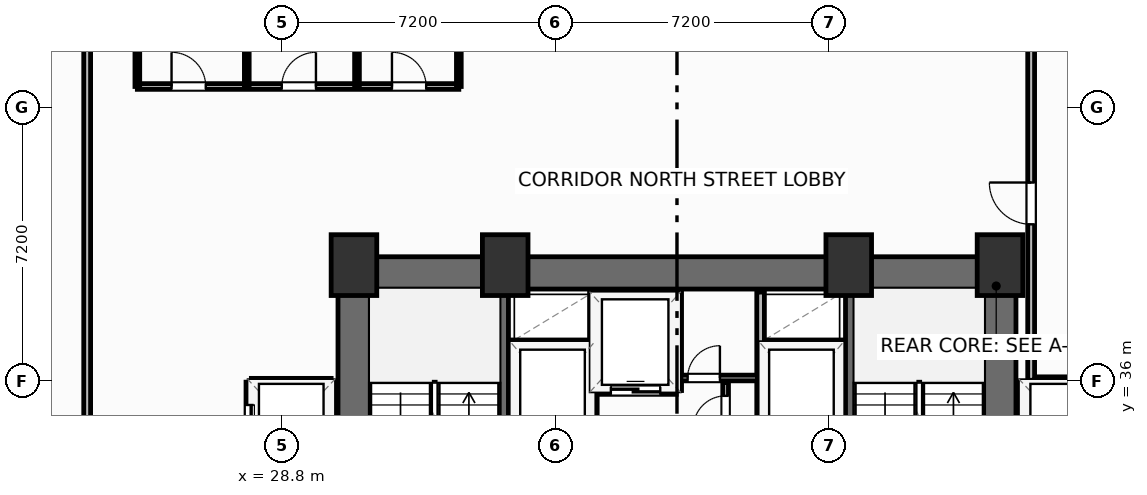
"""IFC4 building model, lengths in metres.
Left out: names, types, materials, properties, quantities, classifications, styles, units other than length and angle.
Written with IfcOpenShell. Run it as: python <this file> out.ifc"""

import sys

from ifc_helpers import new_model, si_unit, direction, frame, frame_2d, origin, origin_2d, place, context, subcontext, project, spatial, rectangle, extrude, element, fill, save


model = new_model("IFC4")
c1 = context("Model", 3, precision=1e-05, world=origin(), true_north=direction((0.0, 1.0)))
c2 = subcontext(c1, "Body", "Model", "MODEL_VIEW")
j1 = project(units=[si_unit("LENGTHUNIT", "METRE"), si_unit("PLANEANGLEUNIT", "RADIAN")], contexts=[c1])
p1 = place(None, origin())
s1 = spatial("IfcSite", under=j1, at=p1, CompositionType="ELEMENT")
p2 = place(p1, origin())
s2 = spatial("IfcBuilding", under=s1, at=p2, CompositionType="ELEMENT")
p3 = place(p2, origin())
s3 = spatial("IfcBuildingStorey", under=s2, at=p3, CompositionType="ELEMENT", Elevation=0.0)
for number, where, z_axis, x_axis in (
    (1, (30.7, 39.05, 0.0), (0.0, 0.0, 1.0), (1.0, 0.0, 0.0)),
    (2, (34.68, 39.05, 0.0), (0.0, 0.0, 1.0), (1.0, 0.0, 0.0)),
    (3, (43.72, 39.05, 0.0), (0.0, 0.0, 1.0), (1.0, 0.0, 0.0)),
    (4, (47.7, 39.05, 0.0), (0.0, 0.0, 1.0), (1.0, 0.0, 0.0)),
):
    element("IfcColumn", number, at=place(p3, frame(where, z_axis=z_axis, x_axis=x_axis)), inside=s3, PredefinedType="COLUMN", context=c2, shape_type="SweptSolid", body=[
        extrude(rectangle(XDim=1.2, YDim=1.6, at=origin_2d()), origin(), (0.0, 0.0, 1.0), 5.4),
    ])
p4 = place(p3, frame((30.28, 38.845, 0.0), z_axis=(0.0, 0.0, 1.0), x_axis=(1.0, 0.0, 0.0)))
e5 = element("IfcWall", 5, at=p4, inside=s3, PredefinedType="SHEAR", context=c2, shape_type="SweptSolid", body=[
    extrude(rectangle(XDim=17.84, YDim=0.85, at=frame_2d((8.92, 0.0))), origin(), (0.0, 0.0, 1.0), 5.12),
])
for number, where, z_axis, x_axis in (
    (6, (30.705, 29.2, 0.0), (0.0, 0.0, 1.0), (0.0, 1.0, 0.0)),
    (7, (47.695, 29.2, 0.0), (0.0, 0.0, 1.0), (0.0, 1.0, 0.0)),
):
    element("IfcWall", number, at=place(p3, frame(where, z_axis=z_axis, x_axis=x_axis)), inside=s3, PredefinedType="SHEAR", context=c2, shape_type="SweptSolid", body=[
        extrude(rectangle(XDim=9.22, YDim=0.85, at=frame_2d((4.61, 0.0))), origin(), (0.0, 0.0, 1.0), 5.12),
    ])
for number, where, z_axis, x_axis in (
    (8, (34.64, 29.2, 0.0), (0.0, 0.0, 1.0), (0.0, 1.0, 0.0)),
    (9, (43.76, 29.2, 0.0), (0.0, 0.0, 1.0), (0.0, 1.0, 0.0)),
):
    element("IfcWall", number, at=place(p3, frame(where, z_axis=z_axis, x_axis=x_axis)), inside=s3, PredefinedType="SHEAR", context=c2, shape_type="SweptSolid", body=[
        extrude(rectangle(XDim=9.22, YDim=0.25, at=frame_2d((4.61, 0.0))), origin(), (0.0, 0.0, 1.0), 5.12),
    ])
p5 = place(p3, frame((25.0, 43.75, 0.0), z_axis=(0.0, 0.0, 1.0), x_axis=(1.0, 0.0, 0.0)))
e10 = element("IfcWall", 10, at=p5, inside=s3, PredefinedType="PARTITIONING", context=c2, shape_type="SweptSolid", body=[
    extrude(rectangle(XDim=8.46, YDim=0.15, at=frame_2d((4.23, 0.0))), origin(), (0.0, 0.0, 1.0), 5.12),
])
p6 = place(p5, frame((0.9, 0.0, 0.0)))
e11 = element("IfcOpeningElement", 11, at=p6, cuts=e10, PredefinedType="OPENING", context=c2, shape_type="SweptSolid", body=[
    extrude(rectangle(XDim=0.9, YDim=2.05, at=frame_2d((0.45, 1.025))), frame((0.0, 0.085, 0.0), z_axis=(0.0, -1.0, 0.0), x_axis=(1.0, 0.0, 0.0)), (0.0, 0.0, 1.0), 0.17),
])
p7 = place(p5, frame((3.8, 0.0, 0.0)))
e12 = element("IfcOpeningElement", 12, at=p7, cuts=e10, PredefinedType="OPENING", context=c2, shape_type="SweptSolid", body=[
    extrude(rectangle(XDim=0.9, YDim=2.05, at=frame_2d((0.45, 1.025))), frame((0.0, 0.085, 0.0), z_axis=(0.0, -1.0, 0.0), x_axis=(1.0, 0.0, 0.0)), (0.0, 0.0, 1.0), 0.17),
])
p8 = place(p5, frame((6.7, 0.0, 0.0)))
e13 = element("IfcOpeningElement", 13, at=p8, cuts=e10, PredefinedType="OPENING", context=c2, shape_type="SweptSolid", body=[
    extrude(rectangle(XDim=0.9, YDim=2.05, at=frame_2d((0.45, 1.025))), frame((0.0, 0.085, 0.0), z_axis=(0.0, -1.0, 0.0), x_axis=(1.0, 0.0, 0.0)), (0.0, 0.0, 1.0), 0.17),
])
for number, where, z_axis, x_axis in (
    (14, (25.0, 43.75, 0.0), (0.0, 0.0, 1.0), (0.0, 1.0, 0.0)),
    (15, (27.88, 43.75, 0.0), (0.0, 0.0, 1.0), (0.0, 1.0, 0.0)),
    (16, (30.78, 43.75, 0.0), (0.0, 0.0, 1.0), (0.0, 1.0, 0.0)),
    (17, (33.46, 43.75, 0.0), (0.0, 0.0, 1.0), (0.0, 1.0, 0.0)),
):
    element("IfcWall", number, at=place(p3, frame(where, z_axis=z_axis, x_axis=x_axis)), inside=s3, PredefinedType="PARTITIONING", context=c2, shape_type="SweptSolid", body=[
        extrude(rectangle(XDim=5.13, YDim=0.125, at=frame_2d((2.565, 0.0))), origin(), (0.0, 0.0, 1.0), 5.12),
    ])
p9 = place(p3, frame((23.68, 28.8, 0.0), z_axis=(0.0, 0.0, 1.0), x_axis=(0.0, 1.0, 0.0)))
e18 = element("IfcWall", 18, at=p9, inside=s3, PredefinedType="PARTITIONING", context=c2, shape_type="SweptSolid", body=[
    extrude(rectangle(XDim=21.52, YDim=0.18, at=frame_2d((10.76, 0.0))), origin(), (0.0, 0.0, 1.0), 5.12),
])
p10 = place(p3, frame((48.52, 36.02, 0.0), z_axis=(0.0, 0.0, 1.0), x_axis=(1.0, 0.0, 0.0)))
e19 = element("IfcWall", 19, at=p10, inside=s3, PredefinedType="PARTITIONING", context=c2, shape_type="SweptSolid", body=[
    extrude(rectangle(XDim=3.62, YDim=0.18, at=frame_2d((1.81, 0.0))), origin(), (0.0, 0.0, 1.0), 5.12),
])
p11 = place(p10, frame((2.208, 0.0, 0.0)))
e20 = element("IfcOpeningElement", 20, at=p11, cuts=e19, PredefinedType="OPENING", context=c2, shape_type="SweptSolid", body=[
    extrude(rectangle(XDim=1.1, YDim=2.15, at=frame_2d((0.55, 1.075))), frame((0.0, 0.1, 0.0), z_axis=(0.0, -1.0, 0.0), x_axis=(1.0, 0.0, 0.0)), (0.0, 0.0, 1.0), 0.2),
])
p12 = place(p3, frame((48.52, 36.02, 0.0), z_axis=(0.0, 0.0, 1.0), x_axis=(0.0, 1.0, 0.0)))
e21 = element("IfcWall", 21, at=p12, inside=s3, PredefinedType="PARTITIONING", context=c2, shape_type="SweptSolid", body=[
    extrude(rectangle(XDim=14.3, YDim=0.18, at=frame_2d((7.15, 0.0))), origin(), (0.0, 0.0, 1.0), 5.12),
])
p13 = place(p12, frame((4.103, 0.0, 0.0)))
e22 = element("IfcOpeningElement", 22, at=p13, cuts=e21, PredefinedType="OPENING", context=c2, shape_type="SweptSolid", body=[
    extrude(rectangle(XDim=1.1, YDim=2.15, at=frame_2d((0.55, 1.075))), frame((0.0, 0.1, 0.0), z_axis=(0.0, -1.0, 0.0), x_axis=(1.0, 0.0, 0.0)), (0.0, 0.0, 1.0), 0.2),
])
p14 = place(p3, frame((34.8, 36.98, 0.0), z_axis=(0.0, 0.0, 1.0), x_axis=(1.0, 0.0, 0.0)))
e23 = element("IfcWall", 23, at=p14, inside=s3, PredefinedType="PARTITIONING", context=c2, shape_type="SweptSolid", body=[
    extrude(rectangle(XDim=2.18, YDim=0.2, at=frame_2d((1.09, 0.0))), origin(), (0.0, 0.0, 1.0), 5.12),
])
p15 = place(p3, frame((37.0, 34.44, 0.0), z_axis=(0.0, 0.0, 1.0), x_axis=(0.0, 1.0, 0.0)))
e24 = element("IfcWall", 24, at=p15, inside=s3, PredefinedType="PARTITIONING", context=c2, shape_type="SweptSolid", body=[
    extrude(rectangle(XDim=3.9, YDim=0.2, at=frame_2d((1.95, 0.0))), origin(), (0.0, 0.0, 1.0), 5.12),
])
p16 = place(p3, frame((41.42, 36.98, 0.0), z_axis=(0.0, 0.0, 1.0), x_axis=(1.0, 0.0, 0.0)))
e25 = element("IfcWall", 25, at=p16, inside=s3, PredefinedType="PARTITIONING", context=c2, shape_type="SweptSolid", body=[
    extrude(rectangle(XDim=2.18, YDim=0.2, at=frame_2d((1.09, 0.0))), origin(), (0.0, 0.0, 1.0), 5.12),
])
p17 = place(p3, frame((41.4, 34.44, 0.0), z_axis=(0.0, 0.0, 1.0), x_axis=(0.0, 1.0, 0.0)))
e26 = element("IfcWall", 26, at=p17, inside=s3, PredefinedType="PARTITIONING", context=c2, shape_type="SweptSolid", body=[
    extrude(rectangle(XDim=3.9, YDim=0.2, at=frame_2d((1.95, 0.0))), origin(), (0.0, 0.0, 1.0), 5.12),
])
p18 = place(p3, frame((37.06, 35.75, 0.0), z_axis=(0.0, 0.0, 1.0), x_axis=(1.0, 0.0, 0.0)))
e27 = element("IfcWall", 27, at=p18, inside=s3, PredefinedType="PARTITIONING", context=c2, shape_type="SweptSolid", body=[
    extrude(rectangle(XDim=2.12, YDim=0.2, at=frame_2d((1.06, 0.0))), origin(), (0.0, 0.0, 1.0), 5.12),
])
p19 = place(p18, frame((0.4, 0.0, 0.0)))
e28 = element("IfcOpeningElement", 28, at=p19, cuts=e27, PredefinedType="OPENING", context=c2, shape_type="SweptSolid", body=[
    extrude(rectangle(XDim=1.3, YDim=2.2, at=frame_2d((0.65, 1.1))), frame((0.0, 0.11, 0.0), z_axis=(0.0, -1.0, 0.0), x_axis=(1.0, 0.0, 0.0)), (0.0, 0.0, 1.0), 0.22),
])
p20 = place(p3, frame((39.22, 35.75, 0.0), z_axis=(0.0, 0.0, 1.0), x_axis=(0.0, 1.0, 0.0)))
e29 = element("IfcWall", 29, at=p20, inside=s3, PredefinedType="PARTITIONING", context=c2, shape_type="SweptSolid", body=[
    extrude(rectangle(XDim=2.59, YDim=0.2, at=frame_2d((1.295, 0.0))), origin(), (0.0, 0.0, 1.0), 5.12),
])
p21 = place(p3, frame((39.3, 36.08, 0.0), z_axis=(0.0, 0.0, 1.0), x_axis=(1.0, 0.0, 0.0)))
e30 = element("IfcWall", 30, at=p21, inside=s3, PredefinedType="PARTITIONING", context=c2, shape_type="SweptSolid", body=[
    extrude(rectangle(XDim=2.02, YDim=0.15, at=frame_2d((1.01, 0.0))), origin(), (0.0, 0.0, 1.0), 5.12),
])
p22 = place(p21, frame((0.18, 0.0, 0.0)))
e31 = element("IfcOpeningElement", 31, at=p22, cuts=e30, PredefinedType="OPENING", context=c2, shape_type="SweptSolid", body=[
    extrude(rectangle(XDim=0.85, YDim=2.05, at=frame_2d((0.425, 1.025))), frame((0.0, 0.085, 0.0), z_axis=(0.0, -1.0, 0.0), x_axis=(1.0, 0.0, 0.0)), (0.0, 0.0, 1.0), 0.17),
])
p23 = place(p3, frame((40.48, 34.44, 0.0), z_axis=(0.0, 0.0, 1.0), x_axis=(0.0, 1.0, 0.0)))
e32 = element("IfcWall", 32, at=p23, inside=s3, PredefinedType="PARTITIONING", context=c2, shape_type="SweptSolid", body=[
    extrude(rectangle(XDim=1.52, YDim=0.15, at=frame_2d((0.76, 0.0))), origin(), (0.0, 0.0, 1.0), 5.12),
])
p24 = place(p23, frame((0.32, 0.0, 0.0)))
e33 = element("IfcOpeningElement", 33, at=p24, cuts=e32, PredefinedType="OPENING", context=c2, shape_type="SweptSolid", body=[
    extrude(rectangle(XDim=0.85, YDim=2.05, at=frame_2d((0.425, 1.025))), frame((0.0, 0.085, 0.0), z_axis=(0.0, -1.0, 0.0), x_axis=(1.0, 0.0, 0.0)), (0.0, 0.0, 1.0), 0.17),
])
p25 = place(p3, frame((28.0, 35.97, 0.0), z_axis=(0.0, 0.0, 1.0), x_axis=(1.0, 0.0, 0.0)))
e34 = element("IfcWall", 34, at=p25, inside=s3, PredefinedType="PARTITIONING", context=c2, shape_type="SweptSolid", body=[
    extrude(rectangle(XDim=2.1, YDim=0.2, at=frame_2d((1.05, 0.0))), origin(), (0.0, 0.0, 1.0), 5.12),
])
p26 = place(p3, frame((30.12, 29.08, 0.0), z_axis=(0.0, 0.0, 1.0), x_axis=(0.0, 1.0, 0.0)))
e35 = element("IfcWall", 35, at=p26, inside=s3, PredefinedType="PARTITIONING", context=c2, shape_type="SweptSolid", body=[
    extrude(rectangle(XDim=6.89, YDim=0.2, at=frame_2d((3.445, 0.0))), origin(), (0.0, 0.0, 1.0), 5.12),
])
p27 = place(p3, frame((27.96, 29.08, 0.0), z_axis=(0.0, 0.0, 1.0), x_axis=(0.0, 1.0, 0.0)))
e36 = element("IfcWall", 36, at=p27, inside=s3, PredefinedType="PARTITIONING", context=c2, shape_type="SweptSolid", body=[
    extrude(rectangle(XDim=6.89, YDim=0.2, at=frame_2d((3.445, 0.0))), origin(), (0.0, 0.0, 1.0), 5.12),
])
p28 = place(p27, frame((0.59, 0.0, 0.0)))
e37 = element("IfcOpeningElement", 37, at=p28, cuts=e36, PredefinedType="OPENING", context=c2, shape_type="SweptSolid", body=[
    extrude(rectangle(XDim=1.1, YDim=2.15, at=frame_2d((0.55, 1.075))), frame((0.0, 0.11, 0.0), z_axis=(0.0, -1.0, 0.0), x_axis=(1.0, 0.0, 0.0)), (0.0, 0.0, 1.0), 0.22),
])
p29 = place(p27, frame((2.89, 0.0, 0.0)))
e38 = element("IfcOpeningElement", 38, at=p29, cuts=e36, PredefinedType="OPENING", context=c2, shape_type="SweptSolid", body=[
    extrude(rectangle(XDim=1.1, YDim=2.15, at=frame_2d((0.55, 1.075))), frame((0.0, 0.11, 0.0), z_axis=(0.0, -1.0, 0.0), x_axis=(1.0, 0.0, 0.0)), (0.0, 0.0, 1.0), 0.22),
])
p30 = place(p27, frame((5.19, 0.0, 0.0)))
e39 = element("IfcOpeningElement", 39, at=p30, cuts=e36, PredefinedType="OPENING", context=c2, shape_type="SweptSolid", body=[
    extrude(rectangle(XDim=1.1, YDim=2.15, at=frame_2d((0.55, 1.075))), frame((0.0, 0.11, 0.0), z_axis=(0.0, -1.0, 0.0), x_axis=(1.0, 0.0, 0.0)), (0.0, 0.0, 1.0), 0.22),
])
p31 = place(p3, frame((48.28, 29.08, 0.0), z_axis=(0.0, 0.0, 1.0), x_axis=(0.0, 1.0, 0.0)))
e40 = element("IfcWall", 40, at=p31, inside=s3, PredefinedType="PARTITIONING", context=c2, shape_type="SweptSolid", body=[
    extrude(rectangle(XDim=6.89, YDim=0.2, at=frame_2d((3.445, 0.0))), origin(), (0.0, 0.0, 1.0), 5.12),
])
p32 = place(p6, origin())
e41 = element("IfcDoor", 41, at=p32, inside=s3, OperationType="SINGLE_SWING_LEFT", PredefinedType="DOOR", context=c2, shape_type="SweptSolid", body=[
    extrude(rectangle(XDim=0.9, YDim=2.05, at=frame_2d((0.45, 1.025))), frame((0.0, 0.025, 0.0), z_axis=(0.0, -1.0, 0.0), x_axis=(1.0, 0.0, 0.0)), (0.0, 0.0, 1.0), 0.05),
])
fill(e11, e41)
p33 = place(p7, origin())
e42 = element("IfcDoor", 42, at=p33, inside=s3, OperationType="SINGLE_SWING_RIGHT", PredefinedType="DOOR", context=c2, shape_type="SweptSolid", body=[
    extrude(rectangle(XDim=0.9, YDim=2.05, at=frame_2d((0.45, 1.025))), frame((0.0, 0.025, 0.0), z_axis=(0.0, -1.0, 0.0), x_axis=(1.0, 0.0, 0.0)), (0.0, 0.0, 1.0), 0.05),
])
fill(e12, e42)
p34 = place(p8, origin())
e43 = element("IfcDoor", 43, at=p34, inside=s3, OperationType="SINGLE_SWING_LEFT", PredefinedType="DOOR", context=c2, shape_type="SweptSolid", body=[
    extrude(rectangle(XDim=0.9, YDim=2.05, at=frame_2d((0.45, 1.025))), frame((0.0, 0.025, 0.0), z_axis=(0.0, -1.0, 0.0), x_axis=(1.0, 0.0, 0.0)), (0.0, 0.0, 1.0), 0.05),
])
fill(e13, e43)
p35 = place(p13, origin())
e44 = element("IfcDoor", 44, at=p35, inside=s3, OperationType="SINGLE_SWING_RIGHT", PredefinedType="DOOR", context=c2, shape_type="SweptSolid", body=[
    extrude(rectangle(XDim=1.1, YDim=2.15, at=frame_2d((0.55, 1.075))), frame((0.0, 0.025, 0.0), z_axis=(0.0, -1.0, 0.0), x_axis=(1.0, 0.0, 0.0)), (0.0, 0.0, 1.0), 0.05),
])
fill(e22, e44)
p36 = place(p19, origin())
e45 = element("IfcDoor", 45, at=p36, inside=s3, OperationType="SLIDING_TO_LEFT", PredefinedType="DOOR", context=c2, shape_type="SweptSolid", body=[
    extrude(rectangle(XDim=1.3, YDim=2.2, at=frame_2d((0.65, 1.1))), frame((0.0, 0.025, 0.0), z_axis=(0.0, -1.0, 0.0), x_axis=(1.0, 0.0, 0.0)), (0.0, 0.0, 1.0), 0.05),
])
fill(e28, e45)
p37 = place(p22, origin())
e46 = element("IfcDoor", 46, at=p37, inside=s3, OperationType="SINGLE_SWING_RIGHT", PredefinedType="DOOR", context=c2, shape_type="SweptSolid", body=[
    extrude(rectangle(XDim=0.85, YDim=2.05, at=frame_2d((0.425, 1.025))), frame((0.0, 0.025, 0.0), z_axis=(0.0, -1.0, 0.0), x_axis=(1.0, 0.0, 0.0)), (0.0, 0.0, 1.0), 0.05),
])
fill(e31, e46)
p38 = place(p24, origin())
e47 = element("IfcDoor", 47, at=p38, inside=s3, OperationType="SINGLE_SWING_LEFT", PredefinedType="DOOR", context=c2, shape_type="SweptSolid", body=[
    extrude(rectangle(XDim=0.85, YDim=2.05, at=frame_2d((0.425, 1.025))), frame((0.0, 0.025, 0.0), z_axis=(0.0, -1.0, 0.0), x_axis=(1.0, 0.0, 0.0)), (0.0, 0.0, 1.0), 0.05),
])
fill(e33, e47)
p39 = place(p30, origin())
e48 = element("IfcDoor", 48, at=p39, inside=s3, OperationType="SLIDING_TO_LEFT", PredefinedType="DOOR", context=c2, shape_type="SweptSolid", body=[
    extrude(rectangle(XDim=1.1, YDim=2.15, at=frame_2d((0.55, 1.075))), frame((0.0, 0.025, 0.0), z_axis=(0.0, -1.0, 0.0), x_axis=(1.0, 0.0, 0.0)), (0.0, 0.0, 1.0), 0.05),
])
fill(e39, e48)
save(model, sys.argv[1])
